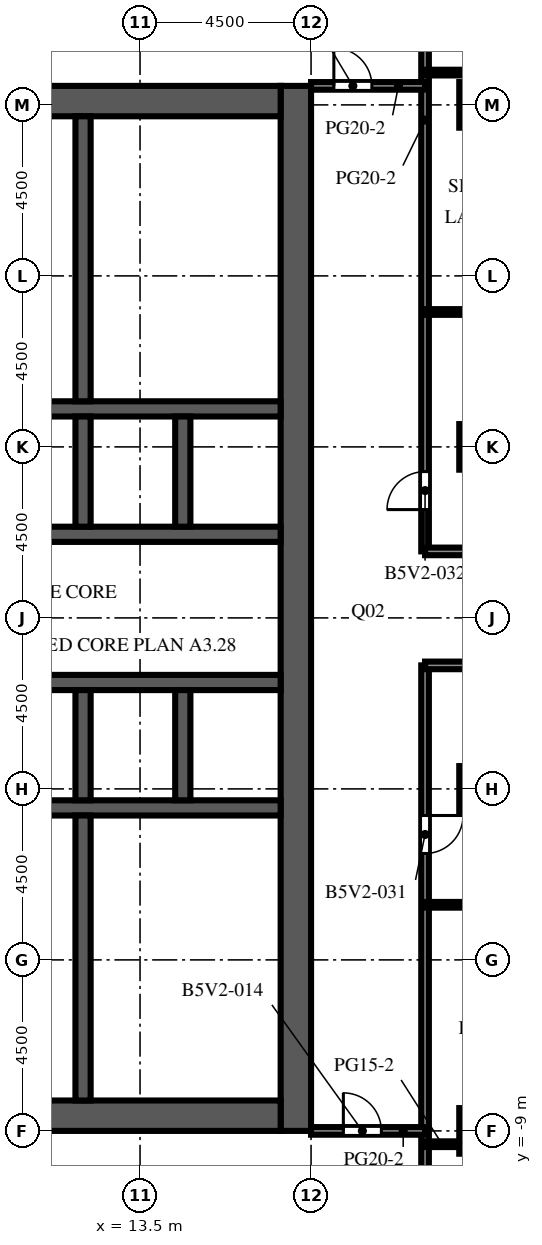
"""IFC4 building model, lengths in metres.
Left out: names, types, materials, properties, quantities, classifications, styles, units other than length and angle.
Written with IfcOpenShell. Run it as: python <this file> out.ifc"""

import sys

from ifc_helpers import new_model, si_unit, direction, frame, frame_2d, origin, origin_2d, place, context, subcontext, project, spatial, rectangle, extrude, element, fill, save


model = new_model("IFC4")
c1 = context("Model", 3, precision=1e-05, world=origin(), true_north=direction((0.0, 1.0)))
c2 = subcontext(c1, "Body", "Model", "MODEL_VIEW")
j1 = project(units=[si_unit("LENGTHUNIT", "METRE"), si_unit("PLANEANGLEUNIT", "RADIAN")], contexts=[c1])
p1 = place(None, origin())
s1 = spatial("IfcSite", under=j1, at=p1, CompositionType="ELEMENT")
p2 = place(p1, origin())
s2 = spatial("IfcBuilding", under=s1, at=p2, CompositionType="ELEMENT")
p3 = place(p2, frame((0.0, 0.0, 181.4)))
s3 = spatial("IfcBuildingStorey", under=s2, at=p3, CompositionType="ELEMENT", Elevation=181.4)
for number, where, z_axis, x_axis in (
    (1, (22.5, -9.0, 0.0), (0.0, 0.0, 1.0), (1.0, 0.0, 0.0)),
    (2, (22.5, 0.0, 0.0), (0.0, 0.0, 1.0), (1.0, 0.0, 0.0)),
    (3, (22.5, 9.0, 0.0), (0.0, 0.0, 1.0), (1.0, 0.0, 0.0)),
    (4, (22.5, 18.0, 0.0), (0.0, 0.0, 1.0), (1.0, 0.0, 0.0)),
):
    element("IfcColumn", number, at=place(p3, frame(where, z_axis=z_axis, x_axis=x_axis)), inside=s3, PredefinedType="COLUMN", context=c2, shape_type="SweptSolid", body=[
        extrude(rectangle(XDim=1.2, YDim=1.2, at=origin_2d()), origin(), (0.0, 0.0, 1.0), 4.1),
    ])
p4 = place(p3, frame((17.6, -9.0, 0.0), z_axis=(0.0, 0.0, 1.0), x_axis=(0.0, 1.0, 0.0)))
e5 = element("IfcWall", 5, at=p4, inside=s3, PredefinedType="SHEAR", context=c2, shape_type="SweptSolid", body=[
    extrude(rectangle(XDim=27.5, YDim=0.8, at=frame_2d((13.75, 0.0))), origin(), (0.0, 0.0, 1.0), 4.1),
])
p5 = place(p4, frame((12.55, 0.0, 0.0)))
e6 = element("IfcOpeningElement", 6, at=p5, cuts=e5, PredefinedType="OPENING", context=c2, shape_type="SweptSolid", body=[
    extrude(rectangle(XDim=2.4, YDim=2.4, at=frame_2d((1.2, 1.2))), frame((0.0, 0.41, 0.0), z_axis=(0.0, -1.0, 0.0), x_axis=(1.0, 0.0, 0.0)), (0.0, 0.0, 1.0), 0.82),
])
p6 = place(p4, frame((6.825, 0.0, 0.0)))
e7 = element("IfcOpeningElement", 7, at=p6, cuts=e5, PredefinedType="OPENING", context=c2, shape_type="SweptSolid", body=[
    extrude(rectangle(XDim=1.2, YDim=2.1, at=frame_2d((0.6, 1.05))), frame((0.0, 0.41, 0.0), z_axis=(0.0, -1.0, 0.0), x_axis=(1.0, 0.0, 0.0)), (0.0, 0.0, 1.0), 0.82),
])
p7 = place(p4, frame((19.475, 0.0, 0.0)))
e8 = element("IfcOpeningElement", 8, at=p7, cuts=e5, PredefinedType="OPENING", context=c2, shape_type="SweptSolid", body=[
    extrude(rectangle(XDim=1.2, YDim=2.1, at=frame_2d((0.6, 1.05))), frame((0.0, 0.41, 0.0), z_axis=(0.0, -1.0, 0.0), x_axis=(1.0, 0.0, 0.0)), (0.0, 0.0, 1.0), 0.82),
])
for number, where, z_axis, x_axis in (
    (9, (6.8, -8.6, 0.0), (0.0, 0.0, 1.0), (1.0, 0.0, 0.0)),
    (10, (6.8, 18.1, 0.0), (0.0, 0.0, 1.0), (1.0, 0.0, 0.0)),
):
    element("IfcWall", number, at=place(p3, frame(where, z_axis=z_axis, x_axis=x_axis)), inside=s3, PredefinedType="SHEAR", context=c2, shape_type="SweptSolid", body=[
        extrude(rectangle(XDim=10.4, YDim=0.8, at=frame_2d((5.2, 0.0))), origin(), (0.0, 0.0, 1.0), 4.1),
    ])
p8 = place(p3, frame((6.8, -0.5, 0.0), z_axis=(0.0, 0.0, 1.0), x_axis=(1.0, 0.0, 0.0)))
e11 = element("IfcWall", 11, at=p8, inside=s3, PredefinedType="SHEAR", context=c2, shape_type="SweptSolid", body=[
    extrude(rectangle(XDim=10.4, YDim=0.4, at=frame_2d((5.2, 0.0))), origin(), (0.0, 0.0, 1.0), 4.1),
])
p9 = place(p3, frame((6.8, 2.8, 0.0), z_axis=(0.0, 0.0, 1.0), x_axis=(1.0, 0.0, 0.0)))
e12 = element("IfcWall", 12, at=p9, inside=s3, PredefinedType="SHEAR", context=c2, shape_type="SweptSolid", body=[
    extrude(rectangle(XDim=10.4, YDim=0.4, at=frame_2d((5.2, 0.0))), origin(), (0.0, 0.0, 1.0), 4.1),
])
p10 = place(p9, frame((0.738, 0.0, 0.0)))
e13 = element("IfcOpeningElement", 13, at=p10, cuts=e12, PredefinedType="OPENING", context=c2, shape_type="SweptSolid", body=[
    extrude(rectangle(XDim=1.1, YDim=2.1, at=frame_2d((0.55, 1.05))), frame((0.0, 0.21, 0.0), z_axis=(0.0, -1.0, 0.0), x_axis=(1.0, 0.0, 0.0)), (0.0, 0.0, 1.0), 0.42),
])
p11 = place(p9, frame((3.337, 0.0, 0.0)))
e14 = element("IfcOpeningElement", 14, at=p11, cuts=e12, PredefinedType="OPENING", context=c2, shape_type="SweptSolid", body=[
    extrude(rectangle(XDim=1.1, YDim=2.1, at=frame_2d((0.55, 1.05))), frame((0.0, 0.21, 0.0), z_axis=(0.0, -1.0, 0.0), x_axis=(1.0, 0.0, 0.0)), (0.0, 0.0, 1.0), 0.42),
])
p12 = place(p9, frame((6.012, 0.0, 0.0)))
e15 = element("IfcOpeningElement", 15, at=p12, cuts=e12, PredefinedType="OPENING", context=c2, shape_type="SweptSolid", body=[
    extrude(rectangle(XDim=1.0, YDim=2.1, at=frame_2d((0.5, 1.05))), frame((0.0, 0.21, 0.0), z_axis=(0.0, -1.0, 0.0), x_axis=(1.0, 0.0, 0.0)), (0.0, 0.0, 1.0), 0.42),
])
p13 = place(p9, frame((8.613, 0.0, 0.0)))
e16 = element("IfcOpeningElement", 16, at=p13, cuts=e12, PredefinedType="OPENING", context=c2, shape_type="SweptSolid", body=[
    extrude(rectangle(XDim=1.0, YDim=2.1, at=frame_2d((0.5, 1.05))), frame((0.0, 0.21, 0.0), z_axis=(0.0, -1.0, 0.0), x_axis=(1.0, 0.0, 0.0)), (0.0, 0.0, 1.0), 0.42),
])
p14 = place(p3, frame((6.8, 6.7, 0.0), z_axis=(0.0, 0.0, 1.0), x_axis=(1.0, 0.0, 0.0)))
e17 = element("IfcWall", 17, at=p14, inside=s3, PredefinedType="SHEAR", context=c2, shape_type="SweptSolid", body=[
    extrude(rectangle(XDim=10.4, YDim=0.4, at=frame_2d((5.2, 0.0))), origin(), (0.0, 0.0, 1.0), 4.1),
])
p15 = place(p14, frame((3.337, 0.0, 0.0)))
e18 = element("IfcOpeningElement", 18, at=p15, cuts=e17, PredefinedType="OPENING", context=c2, shape_type="SweptSolid", body=[
    extrude(rectangle(XDim=1.1, YDim=2.1, at=frame_2d((0.55, 1.05))), frame((0.0, 0.21, 0.0), z_axis=(0.0, -1.0, 0.0), x_axis=(1.0, 0.0, 0.0)), (0.0, 0.0, 1.0), 0.42),
])
p16 = place(p14, frame((5.962, 0.0, 0.0)))
e19 = element("IfcOpeningElement", 19, at=p16, cuts=e17, PredefinedType="OPENING", context=c2, shape_type="SweptSolid", body=[
    extrude(rectangle(XDim=1.1, YDim=2.1, at=frame_2d((0.55, 1.05))), frame((0.0, 0.21, 0.0), z_axis=(0.0, -1.0, 0.0), x_axis=(1.0, 0.0, 0.0)), (0.0, 0.0, 1.0), 0.42),
])
p17 = place(p14, frame((8.663, 0.0, 0.0)))
e20 = element("IfcOpeningElement", 20, at=p17, cuts=e17, PredefinedType="OPENING", context=c2, shape_type="SweptSolid", body=[
    extrude(rectangle(XDim=1.1, YDim=2.1, at=frame_2d((0.55, 1.05))), frame((0.0, 0.21, 0.0), z_axis=(0.0, -1.0, 0.0), x_axis=(1.0, 0.0, 0.0)), (0.0, 0.0, 1.0), 0.42),
])
p18 = place(p14, frame((0.688, 0.0, 0.0)))
e21 = element("IfcOpeningElement", 21, at=p18, cuts=e17, PredefinedType="OPENING", context=c2, shape_type="SweptSolid", body=[
    extrude(rectangle(XDim=1.0, YDim=2.1, at=frame_2d((0.5, 1.05))), frame((0.0, 0.21, 0.0), z_axis=(0.0, -1.0, 0.0), x_axis=(1.0, 0.0, 0.0)), (0.0, 0.0, 1.0), 0.42),
])
p19 = place(p3, frame((6.8, 10.0, 0.0), z_axis=(0.0, 0.0, 1.0), x_axis=(1.0, 0.0, 0.0)))
e22 = element("IfcWall", 22, at=p19, inside=s3, PredefinedType="SHEAR", context=c2, shape_type="SweptSolid", body=[
    extrude(rectangle(XDim=10.4, YDim=0.4, at=frame_2d((5.2, 0.0))), origin(), (0.0, 0.0, 1.0), 4.1),
])
for number, where, z_axis, x_axis in (
    (23, (12.0, -0.3, 0.0), (0.0, 0.0, 1.0), (0.0, 1.0, 0.0)),
    (24, (12.0, 6.9, 0.0), (0.0, 0.0, 1.0), (0.0, 1.0, 0.0)),
    (25, (14.625, -0.3, 0.0), (0.0, 0.0, 1.0), (0.0, 1.0, 0.0)),
    (26, (14.625, 6.9, 0.0), (0.0, 0.0, 1.0), (0.0, 1.0, 0.0)),
):
    element("IfcWall", number, at=place(p3, frame(where, z_axis=z_axis, x_axis=x_axis)), inside=s3, PredefinedType="SHEAR", context=c2, shape_type="SweptSolid", body=[
        extrude(rectangle(XDim=2.9, YDim=0.4, at=frame_2d((1.45, 0.0))), origin(), (0.0, 0.0, 1.0), 4.1),
    ])
for number, where, z_axis, x_axis in (
    (27, (12.0, -8.2, 0.0), (0.0, 0.0, 1.0), (0.0, 1.0, 0.0)),
    (28, (12.0, 10.2, 0.0), (0.0, 0.0, 1.0), (0.0, 1.0, 0.0)),
):
    element("IfcWall", number, at=place(p3, frame(where, z_axis=z_axis, x_axis=x_axis)), inside=s3, PredefinedType="SHEAR", context=c2, shape_type="SweptSolid", body=[
        extrude(rectangle(XDim=7.5, YDim=0.4, at=frame_2d((3.75, 0.0))), origin(), (0.0, 0.0, 1.0), 4.1),
    ])
p20 = place(p3, frame((6.8, -5.35, 0.0), z_axis=(0.0, 0.0, 1.0), x_axis=(1.0, 0.0, 0.0)))
e29 = element("IfcWall", 29, at=p20, inside=s3, PredefinedType="PARTITIONING", context=c2, shape_type="SweptSolid", body=[
    extrude(rectangle(XDim=5.0, YDim=0.1, at=frame_2d((2.5, 0.0))), origin(), (0.0, 0.0, 1.0), 3.5),
])
p21 = place(p20, frame((2.0, 0.0, 0.0)))
e30 = element("IfcOpeningElement", 30, at=p21, cuts=e29, PredefinedType="OPENING", context=c2, shape_type="SweptSolid", body=[
    extrude(rectangle(XDim=1.0, YDim=2.1, at=frame_2d((0.5, 1.05))), frame((0.0, 0.06, 0.0), z_axis=(0.0, -1.0, 0.0), x_axis=(1.0, 0.0, 0.0)), (0.0, 0.0, 1.0), 0.12),
])
p22 = place(p3, frame((9.9, -4.0, 0.0), z_axis=(0.0, 0.0, 1.0), x_axis=(1.0, 0.0, 0.0)))
e31 = element("IfcWall", 31, at=p22, inside=s3, PredefinedType="PARTITIONING", context=c2, shape_type="SweptSolid", body=[
    extrude(rectangle(XDim=1.9, YDim=0.1, at=frame_2d((0.95, 0.0))), origin(), (0.0, 0.0, 1.0), 3.5),
])
p23 = place(p22, frame((0.45, 0.0, 0.0)))
e32 = element("IfcOpeningElement", 32, at=p23, cuts=e31, PredefinedType="OPENING", context=c2, shape_type="SweptSolid", body=[
    extrude(rectangle(XDim=1.0, YDim=2.1, at=frame_2d((0.5, 1.05))), frame((0.0, 0.06, 0.0), z_axis=(0.0, -1.0, 0.0), x_axis=(1.0, 0.0, 0.0)), (0.0, 0.0, 1.0), 0.12),
])
for number, where, z_axis, x_axis in (
    (33, (8.1, 12.45, 0.0), (0.0, 0.0, 1.0), (1.0, 0.0, 0.0)),
    (34, (8.1, 15.075, 0.0), (0.0, 0.0, 1.0), (1.0, 0.0, 0.0)),
):
    element("IfcWall", number, at=place(p3, frame(where, z_axis=z_axis, x_axis=x_axis)), inside=s3, PredefinedType="PARTITIONING", context=c2, shape_type="SweptSolid", body=[
        extrude(rectangle(XDim=3.7, YDim=0.1, at=frame_2d((1.85, 0.0))), origin(), (0.0, 0.0, 1.0), 3.5),
    ])
p24 = place(p3, frame((21.0, 3.25, 0.0), z_axis=(0.0, 0.0, 1.0), x_axis=(0.0, -1.0, 0.0)))
e35 = element("IfcWall", 35, at=p24, inside=s3, PredefinedType="PARTITIONING", context=c2, shape_type="SweptSolid", body=[
    extrude(rectangle(XDim=30.1, YDim=0.2, at=frame_2d((15.05, 0.0))), origin(), (0.0, 0.0, 1.0), 3.5),
])
p25 = place(p24, frame((3.95, 0.0, 0.0)))
e36 = element("IfcOpeningElement", 36, at=p25, cuts=e35, PredefinedType="OPENING", context=c2, shape_type="SweptSolid", body=[
    extrude(rectangle(XDim=1.0, YDim=2.1, at=frame_2d((0.5, 1.05))), frame((0.0, 0.11, 0.0), z_axis=(0.0, -1.0, 0.0), x_axis=(1.0, 0.0, 0.0)), (0.0, 0.0, 1.0), 0.22),
])
p26 = place(p3, frame((21.0, 26.85, 0.0), z_axis=(0.0, 0.0, 1.0), x_axis=(0.0, -1.0, 0.0)))
e37 = element("IfcWall", 37, at=p26, inside=s3, PredefinedType="PARTITIONING", context=c2, shape_type="SweptSolid", body=[
    extrude(rectangle(XDim=20.6, YDim=0.2, at=frame_2d((10.3, 0.0))), origin(), (0.0, 0.0, 1.0), 3.5),
])
p27 = place(p26, frame((18.5, 0.0, 0.0)))
e38 = element("IfcOpeningElement", 38, at=p27, cuts=e37, PredefinedType="OPENING", context=c2, shape_type="SweptSolid", body=[
    extrude(rectangle(XDim=1.0, YDim=2.1, at=frame_2d((0.5, 1.05))), frame((0.0, 0.11, 0.0), z_axis=(0.0, -1.0, 0.0), x_axis=(1.0, 0.0, 0.0)), (0.0, 0.0, 1.0), 0.22),
])
p28 = place(p3, frame((21.0, -9.35, 0.0), z_axis=(0.0, 0.0, 1.0), x_axis=(1.0, 0.0, 0.0)))
e39 = element("IfcWall", 39, at=p28, inside=s3, PredefinedType="PARTITIONING", context=c2, shape_type="SweptSolid", body=[
    extrude(rectangle(XDim=0.9, YDim=0.15, at=frame_2d((0.45, 0.0))), origin(), (0.0, 0.0, 1.0), 3.5),
])
p29 = place(p3, frame((21.0, -9.0, 0.0), z_axis=(0.0, 0.0, 1.0), x_axis=(-1.0, 0.0, 0.0)))
e40 = element("IfcWall", 40, at=p29, inside=s3, PredefinedType="PARTITIONING", context=c2, shape_type="SweptSolid", body=[
    extrude(rectangle(XDim=3.0, YDim=0.2, at=frame_2d((1.5, 0.0))), origin(), (0.0, 0.0, 1.0), 3.5),
])
p30 = place(p29, frame((1.15, 0.0, 0.0)))
e41 = element("IfcOpeningElement", 41, at=p30, cuts=e40, PredefinedType="OPENING", context=c2, shape_type="SweptSolid", body=[
    extrude(rectangle(XDim=1.0, YDim=2.1, at=frame_2d((0.5, 1.05))), frame((0.0, 0.11, 0.0), z_axis=(0.0, -1.0, 0.0), x_axis=(1.0, 0.0, 0.0)), (0.0, 0.0, 1.0), 0.22),
])
p31 = place(p3, frame((26.85, -3.05, 0.0), z_axis=(0.0, 0.0, 1.0), x_axis=(-1.0, 0.0, 0.0)))
e42 = element("IfcWall", 42, at=p31, inside=s3, PredefinedType="PARTITIONING", context=c2, shape_type="SweptSolid", body=[
    extrude(rectangle(XDim=5.85, YDim=0.15, at=frame_2d((2.925, 0.0))), origin(), (0.0, 0.0, 1.0), 3.5),
])
p32 = place(p31, frame((2.5, 0.0, 0.0)))
e43 = element("IfcOpeningElement", 43, at=p32, cuts=e42, PredefinedType="OPENING", context=c2, shape_type="SweptSolid", body=[
    extrude(rectangle(XDim=1.0, YDim=2.1, at=frame_2d((0.5, 1.05))), frame((0.0, 0.085, 0.0), z_axis=(0.0, -1.0, 0.0), x_axis=(1.0, 0.0, 0.0)), (0.0, 0.0, 1.0), 0.17),
])
for number, where, z_axis, x_axis in (
    (44, (21.0, 3.25, 0.0), (0.0, 0.0, 1.0), (1.0, 0.0, 0.0)),
    (45, (21.0, 6.25, 0.0), (0.0, 0.0, 1.0), (1.0, 0.0, 0.0)),
):
    element("IfcWall", number, at=place(p3, frame(where, z_axis=z_axis, x_axis=x_axis)), inside=s3, PredefinedType="PARTITIONING", context=c2, shape_type="SweptSolid", body=[
        extrude(rectangle(XDim=5.85, YDim=0.2, at=frame_2d((2.925, 0.0))), origin(), (0.0, 0.0, 1.0), 3.5),
    ])
p33 = place(p3, frame((21.0, 12.55, 0.0), z_axis=(0.0, 0.0, 1.0), x_axis=(1.0, 0.0, 0.0)))
e46 = element("IfcWall", 46, at=p33, inside=s3, PredefinedType="PARTITIONING", context=c2, shape_type="SweptSolid", body=[
    extrude(rectangle(XDim=5.85, YDim=0.15, at=frame_2d((2.925, 0.0))), origin(), (0.0, 0.0, 1.0), 3.5),
])
p34 = place(p33, frame((3.1, 0.0, 0.0)))
e47 = element("IfcOpeningElement", 47, at=p34, cuts=e46, PredefinedType="OPENING", context=c2, shape_type="SweptSolid", body=[
    extrude(rectangle(XDim=1.0, YDim=2.1, at=frame_2d((0.5, 1.05))), frame((0.0, 0.085, 0.0), z_axis=(0.0, -1.0, 0.0), x_axis=(1.0, 0.0, 0.0)), (0.0, 0.0, 1.0), 0.17),
])
p35 = place(p3, frame((18.0, 18.5, 0.0), z_axis=(0.0, 0.0, 1.0), x_axis=(1.0, 0.0, 0.0)))
e48 = element("IfcWall", 48, at=p35, inside=s3, PredefinedType="PARTITIONING", context=c2, shape_type="SweptSolid", body=[
    extrude(rectangle(XDim=3.0, YDim=0.2, at=frame_2d((1.5, 0.0))), origin(), (0.0, 0.0, 1.0), 3.5),
])
p36 = place(p35, frame((0.6, 0.0, 0.0)))
e49 = element("IfcOpeningElement", 49, at=p36, cuts=e48, PredefinedType="OPENING", context=c2, shape_type="SweptSolid", body=[
    extrude(rectangle(XDim=1.0, YDim=2.1, at=frame_2d((0.5, 1.05))), frame((0.0, 0.11, 0.0), z_axis=(0.0, -1.0, 0.0), x_axis=(1.0, 0.0, 0.0)), (0.0, 0.0, 1.0), 0.22),
])
p37 = place(p3, frame((21.0, 18.85, 0.0), z_axis=(0.0, 0.0, 1.0), x_axis=(1.0, 0.0, 0.0)))
e50 = element("IfcWall", 50, at=p37, inside=s3, PredefinedType="PARTITIONING", context=c2, shape_type="SweptSolid", body=[
    extrude(rectangle(XDim=5.85, YDim=0.15, at=frame_2d((2.925, 0.0))), origin(), (0.0, 0.0, 1.0), 3.5),
])
p38 = place(p37, frame((2.6, 0.0, 0.0)))
e51 = element("IfcOpeningElement", 51, at=p38, cuts=e50, PredefinedType="OPENING", context=c2, shape_type="SweptSolid", body=[
    extrude(rectangle(XDim=1.0, YDim=2.1, at=frame_2d((0.5, 1.05))), frame((0.0, 0.085, 0.0), z_axis=(0.0, -1.0, 0.0), x_axis=(1.0, 0.0, 0.0)), (0.0, 0.0, 1.0), 0.17),
])
p39 = place(p11, origin())
e52 = element("IfcDoor", 52, at=p39, inside=s3, OperationType="DOUBLE_DOOR_SLIDING", PredefinedType="DOOR", context=c2, shape_type="SweptSolid", body=[
    extrude(rectangle(XDim=1.1, YDim=2.1, at=frame_2d((0.55, 1.05))), frame((0.0, 0.025, 0.0), z_axis=(0.0, -1.0, 0.0), x_axis=(1.0, 0.0, 0.0)), (0.0, 0.0, 1.0), 0.05),
])
fill(e14, e52)
p40 = place(p15, origin())
e53 = element("IfcDoor", 53, at=p40, inside=s3, OperationType="DOUBLE_DOOR_SLIDING", PredefinedType="DOOR", context=c2, shape_type="SweptSolid", body=[
    extrude(rectangle(XDim=1.1, YDim=2.1, at=frame_2d((0.55, 1.05))), frame((0.0, 0.025, 0.0), z_axis=(0.0, -1.0, 0.0), x_axis=(1.0, 0.0, 0.0)), (0.0, 0.0, 1.0), 0.05),
])
fill(e18, e53)
p41 = place(p16, origin())
e54 = element("IfcDoor", 54, at=p41, inside=s3, OperationType="DOUBLE_DOOR_SLIDING", PredefinedType="DOOR", context=c2, shape_type="SweptSolid", body=[
    extrude(rectangle(XDim=1.1, YDim=2.1, at=frame_2d((0.55, 1.05))), frame((0.0, 0.025, 0.0), z_axis=(0.0, -1.0, 0.0), x_axis=(1.0, 0.0, 0.0)), (0.0, 0.0, 1.0), 0.05),
])
fill(e19, e54)
p42 = place(p17, origin())
e55 = element("IfcDoor", 55, at=p42, inside=s3, OperationType="DOUBLE_DOOR_SLIDING", PredefinedType="DOOR", context=c2, shape_type="SweptSolid", body=[
    extrude(rectangle(XDim=1.1, YDim=2.1, at=frame_2d((0.55, 1.05))), frame((0.0, 0.025, 0.0), z_axis=(0.0, -1.0, 0.0), x_axis=(1.0, 0.0, 0.0)), (0.0, 0.0, 1.0), 0.05),
])
fill(e20, e55)
p43 = place(p5, origin())
e56 = element("IfcDoor", 56, at=p43, inside=s3, OperationType="DOUBLE_DOOR_DOUBLE_SWING", PredefinedType="DOOR", context=c2, shape_type="SweptSolid", body=[
    extrude(rectangle(XDim=2.4, YDim=2.4, at=frame_2d((1.2, 1.2))), frame((0.0, 0.025, 0.0), z_axis=(0.0, -1.0, 0.0), x_axis=(1.0, 0.0, 0.0)), (0.0, 0.0, 1.0), 0.05),
])
fill(e6, e56)
p44 = place(p6, frame((1.2, 0.0, 0.0), z_axis=(0.0, 0.0, 1.0), x_axis=(-1.0, 0.0, 0.0)))
e57 = element("IfcDoor", 57, at=p44, inside=s3, OperationType="SINGLE_SWING_LEFT", PredefinedType="DOOR", context=c2, shape_type="SweptSolid", body=[
    extrude(rectangle(XDim=1.2, YDim=2.1, at=frame_2d((0.6, 1.05))), frame((0.0, 0.025, 0.0), z_axis=(0.0, -1.0, 0.0), x_axis=(1.0, 0.0, 0.0)), (0.0, 0.0, 1.0), 0.05),
])
fill(e7, e57)
p45 = place(p7, frame((1.2, 0.0, 0.0), z_axis=(0.0, 0.0, 1.0), x_axis=(-1.0, 0.0, 0.0)))
e58 = element("IfcDoor", 58, at=p45, inside=s3, OperationType="SINGLE_SWING_LEFT", PredefinedType="DOOR", context=c2, shape_type="SweptSolid", body=[
    extrude(rectangle(XDim=1.2, YDim=2.1, at=frame_2d((0.6, 1.05))), frame((0.0, 0.025, 0.0), z_axis=(0.0, -1.0, 0.0), x_axis=(1.0, 0.0, 0.0)), (0.0, 0.0, 1.0), 0.05),
])
fill(e8, e58)
p46 = place(p12, origin())
e59 = element("IfcDoor", 59, at=p46, inside=s3, OperationType="SINGLE_SWING_LEFT", PredefinedType="DOOR", context=c2, shape_type="SweptSolid", body=[
    extrude(rectangle(XDim=1.0, YDim=2.1, at=frame_2d((0.5, 1.05))), frame((0.0, 0.025, 0.0), z_axis=(0.0, -1.0, 0.0), x_axis=(1.0, 0.0, 0.0)), (0.0, 0.0, 1.0), 0.05),
])
fill(e15, e59)
p47 = place(p13, origin())
e60 = element("IfcDoor", 60, at=p47, inside=s3, OperationType="SINGLE_SWING_RIGHT", PredefinedType="DOOR", context=c2, shape_type="SweptSolid", body=[
    extrude(rectangle(XDim=1.0, YDim=2.1, at=frame_2d((0.5, 1.05))), frame((0.0, 0.025, 0.0), z_axis=(0.0, -1.0, 0.0), x_axis=(1.0, 0.0, 0.0)), (0.0, 0.0, 1.0), 0.05),
])
fill(e16, e60)
p48 = place(p23, origin())
e61 = element("IfcDoor", 61, at=p48, inside=s3, OperationType="SINGLE_SWING_LEFT", PredefinedType="DOOR", context=c2, shape_type="SweptSolid", body=[
    extrude(rectangle(XDim=1.0, YDim=2.1, at=frame_2d((0.5, 1.05))), frame((0.0, 0.025, 0.0), z_axis=(0.0, -1.0, 0.0), x_axis=(1.0, 0.0, 0.0)), (0.0, 0.0, 1.0), 0.05),
])
fill(e32, e61)
p49 = place(p30, origin())
e62 = element("IfcDoor", 62, at=p49, inside=s3, OperationType="SINGLE_SWING_RIGHT", PredefinedType="DOOR", context=c2, shape_type="SweptSolid", body=[
    extrude(rectangle(XDim=1.0, YDim=2.1, at=frame_2d((0.5, 1.05))), frame((0.0, 0.025, 0.0), z_axis=(0.0, -1.0, 0.0), x_axis=(1.0, 0.0, 0.0)), (0.0, 0.0, 1.0), 0.05),
])
fill(e41, e62)
p50 = place(p36, origin())
e63 = element("IfcDoor", 63, at=p50, inside=s3, OperationType="SINGLE_SWING_LEFT", PredefinedType="DOOR", context=c2, shape_type="SweptSolid", body=[
    extrude(rectangle(XDim=1.0, YDim=2.1, at=frame_2d((0.5, 1.05))), frame((0.0, 0.025, 0.0), z_axis=(0.0, -1.0, 0.0), x_axis=(1.0, 0.0, 0.0)), (0.0, 0.0, 1.0), 0.05),
])
fill(e49, e63)
p51 = place(p25, origin())
e64 = element("IfcDoor", 64, at=p51, inside=s3, OperationType="SINGLE_SWING_LEFT", PredefinedType="DOOR", context=c2, shape_type="SweptSolid", body=[
    extrude(rectangle(XDim=1.0, YDim=2.1, at=frame_2d((0.5, 1.05))), frame((0.0, 0.025, 0.0), z_axis=(0.0, -1.0, 0.0), x_axis=(1.0, 0.0, 0.0)), (0.0, 0.0, 1.0), 0.05),
])
fill(e36, e64)
p52 = place(p27, origin())
e65 = element("IfcDoor", 65, at=p52, inside=s3, OperationType="SINGLE_SWING_RIGHT", PredefinedType="DOOR", context=c2, shape_type="SweptSolid", body=[
    extrude(rectangle(XDim=1.0, YDim=2.1, at=frame_2d((0.5, 1.05))), frame((0.0, 0.025, 0.0), z_axis=(0.0, -1.0, 0.0), x_axis=(1.0, 0.0, 0.0)), (0.0, 0.0, 1.0), 0.05),
])
fill(e38, e65)
save(model, sys.argv[1])
